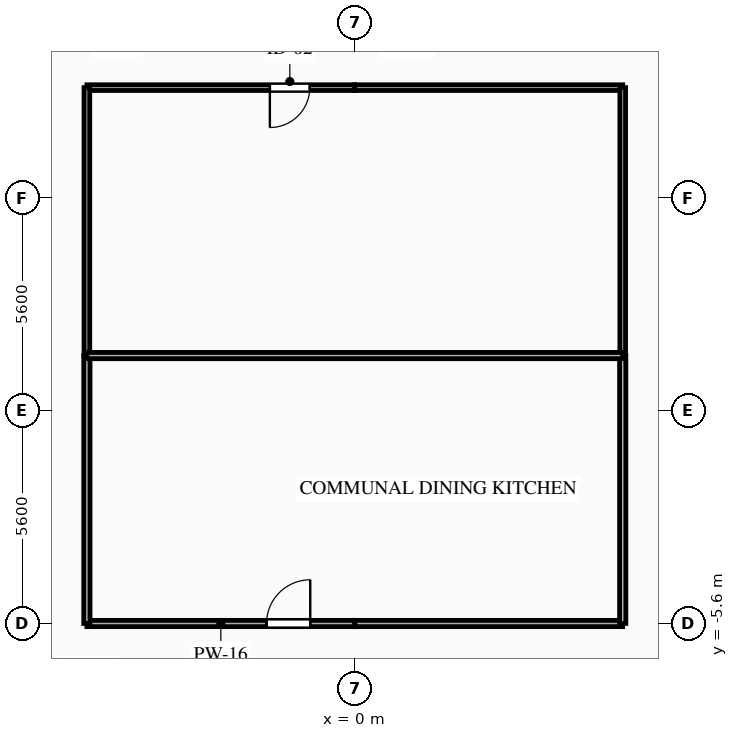
"""IFC4 building model, lengths in metres.
Left out: names, types, materials, properties, quantities, classifications, styles, units other than length and angle.
Written with IfcOpenShell. Run it as: python <this file> out.ifc"""

import sys

from ifc_helpers import new_model, si_unit, direction, frame, frame_2d, origin, place, context, subcontext, project, spatial, rectangle, extrude, element, fill, save


model = new_model("IFC4")
c1 = context("Model", 3, precision=1e-05, world=origin(), true_north=direction((0.0, 1.0)))
c2 = subcontext(c1, "Body", "Model", "MODEL_VIEW")
j1 = project(units=[si_unit("LENGTHUNIT", "METRE"), si_unit("PLANEANGLEUNIT", "RADIAN")], contexts=[c1])
p1 = place(None, origin())
s1 = spatial("IfcSite", under=j1, at=p1, CompositionType="ELEMENT")
p2 = place(p1, origin())
s2 = spatial("IfcBuilding", under=s1, at=p2, CompositionType="ELEMENT")
p3 = place(p2, frame((0.0, 0.0, 79.0)))
s3 = spatial("IfcBuildingStorey", under=s2, at=p3, CompositionType="ELEMENT", Elevation=79.0)
p4 = place(p3, frame((0.0, 8.5, 0.0), z_axis=(0.0, 0.0, 1.0), x_axis=(-1.0, 0.0, 0.0)))
e1 = element("IfcWall", 1, at=p4, inside=s3, PredefinedType="PARTITIONING", context=c2, shape_type="SweptSolid", body=[
    extrude(rectangle(XDim=7.05, YDim=0.15, at=frame_2d((3.525, 0.0))), origin(), (0.0, 0.0, 1.0), 3.045),
])
p5 = place(p4, frame((1.185, 0.0, 0.0)))
e2 = element("IfcOpeningElement", 2, at=p5, cuts=e1, PredefinedType="OPENING", context=c2, shape_type="SweptSolid", body=[
    extrude(rectangle(XDim=1.05, YDim=2.15, at=frame_2d((0.525, 1.075))), frame((0.0, 0.085, 0.0), z_axis=(0.0, -1.0, 0.0), x_axis=(1.0, 0.0, 0.0)), (0.0, 0.0, 1.0), 0.17),
])
p6 = place(p3, frame((7.05, 8.5, 0.0), z_axis=(0.0, 0.0, 1.0), x_axis=(-1.0, 0.0, 0.0)))
e3 = element("IfcWall", 3, at=p6, inside=s3, PredefinedType="PARTITIONING", context=c2, shape_type="SweptSolid", body=[
    extrude(rectangle(XDim=7.05, YDim=0.15, at=frame_2d((3.525, 0.0))), origin(), (0.0, 0.0, 1.0), 3.045),
])
p7 = place(p3, frame((-7.05, -5.6, 0.0), z_axis=(0.0, 0.0, 1.0), x_axis=(1.0, 0.0, 0.0)))
e4 = element("IfcWall", 4, at=p7, inside=s3, PredefinedType="PARTITIONING", context=c2, shape_type="SweptSolid", body=[
    extrude(rectangle(XDim=7.05, YDim=0.165, at=frame_2d((3.525, 0.0))), origin(), (0.0, 0.0, 1.0), 2.53),
])
p8 = place(p7, frame((4.728, 0.0, 0.0)))
e5 = element("IfcOpeningElement", 5, at=p8, cuts=e4, PredefinedType="OPENING", context=c2, shape_type="SweptSolid", body=[
    extrude(rectangle(XDim=1.15, YDim=2.15, at=frame_2d((0.575, 1.075))), frame((0.0, 0.093, 0.0), z_axis=(0.0, -1.0, 0.0), x_axis=(1.0, 0.0, 0.0)), (0.0, 0.0, 1.0), 0.185),
])
p9 = place(p3, frame((0.0, -5.6, 0.0), z_axis=(0.0, 0.0, 1.0), x_axis=(1.0, 0.0, 0.0)))
e6 = element("IfcWall", 6, at=p9, inside=s3, PredefinedType="PARTITIONING", context=c2, shape_type="SweptSolid", body=[
    extrude(rectangle(XDim=7.05, YDim=0.165, at=frame_2d((3.525, 0.0))), origin(), (0.0, 0.0, 1.0), 2.53),
])
p10 = place(p3, frame((-7.05, 1.45, 0.0), z_axis=(0.0, 0.0, 1.0), x_axis=(0.0, -1.0, 0.0)))
e7 = element("IfcWall", 7, at=p10, inside=s3, PredefinedType="PARTITIONING", context=c2, shape_type="SweptSolid", body=[
    extrude(rectangle(XDim=7.05, YDim=0.165, at=frame_2d((3.525, 0.0))), origin(), (0.0, 0.0, 1.0), 3.045),
])
p11 = place(p3, frame((-7.05, 8.5, 0.0), z_axis=(0.0, 0.0, 1.0), x_axis=(0.0, -1.0, 0.0)))
e8 = element("IfcWall", 8, at=p11, inside=s3, PredefinedType="PARTITIONING", context=c2, shape_type="SweptSolid", body=[
    extrude(rectangle(XDim=7.05, YDim=0.15, at=frame_2d((3.525, 0.0))), origin(), (0.0, 0.0, 1.0), 3.045),
])
p12 = place(p3, frame((7.05, -5.6, 0.0), z_axis=(0.0, 0.0, 1.0), x_axis=(0.0, 1.0, 0.0)))
e9 = element("IfcWall", 9, at=p12, inside=s3, PredefinedType="PARTITIONING", context=c2, shape_type="SweptSolid", body=[
    extrude(rectangle(XDim=7.05, YDim=0.165, at=frame_2d((3.525, 0.0))), origin(), (0.0, 0.0, 1.0), 3.045),
])
p13 = place(p3, frame((7.05, 1.45, 0.0), z_axis=(0.0, 0.0, 1.0), x_axis=(0.0, 1.0, 0.0)))
e10 = element("IfcWall", 10, at=p13, inside=s3, PredefinedType="PARTITIONING", context=c2, shape_type="SweptSolid", body=[
    extrude(rectangle(XDim=7.05, YDim=0.15, at=frame_2d((3.525, 0.0))), origin(), (0.0, 0.0, 1.0), 3.045),
])
p14 = place(p3, frame((-7.05, 1.45, 0.0), z_axis=(0.0, 0.0, 1.0), x_axis=(1.0, 0.0, 0.0)))
e11 = element("IfcWall", 11, at=p14, inside=s3, PredefinedType="PARTITIONING", context=c2, shape_type="SweptSolid", body=[
    extrude(rectangle(XDim=14.1, YDim=0.165, at=frame_2d((7.05, 0.0))), origin(), (0.0, 0.0, 1.0), 3.045),
])
p15 = place(p5, origin())
e12 = element("IfcDoor", 12, at=p15, inside=s3, OperationType="SINGLE_SWING_RIGHT", PredefinedType="DOOR", context=c2, shape_type="SweptSolid", body=[
    extrude(rectangle(XDim=1.05, YDim=2.15, at=frame_2d((0.525, 1.075))), frame((0.0, 0.025, 0.0), z_axis=(0.0, -1.0, 0.0), x_axis=(1.0, 0.0, 0.0)), (0.0, 0.0, 1.0), 0.05),
])
fill(e2, e12)
p16 = place(p8, origin())
e13 = element("IfcDoor", 13, at=p16, inside=s3, OperationType="SINGLE_SWING_RIGHT", PredefinedType="DOOR", context=c2, shape_type="SweptSolid", body=[
    extrude(rectangle(XDim=1.15, YDim=2.15, at=frame_2d((0.575, 1.075))), frame((0.0, 0.025, 0.0), z_axis=(0.0, -1.0, 0.0), x_axis=(1.0, 0.0, 0.0)), (0.0, 0.0, 1.0), 0.05),
])
fill(e5, e13)
save(model, sys.argv[1])
